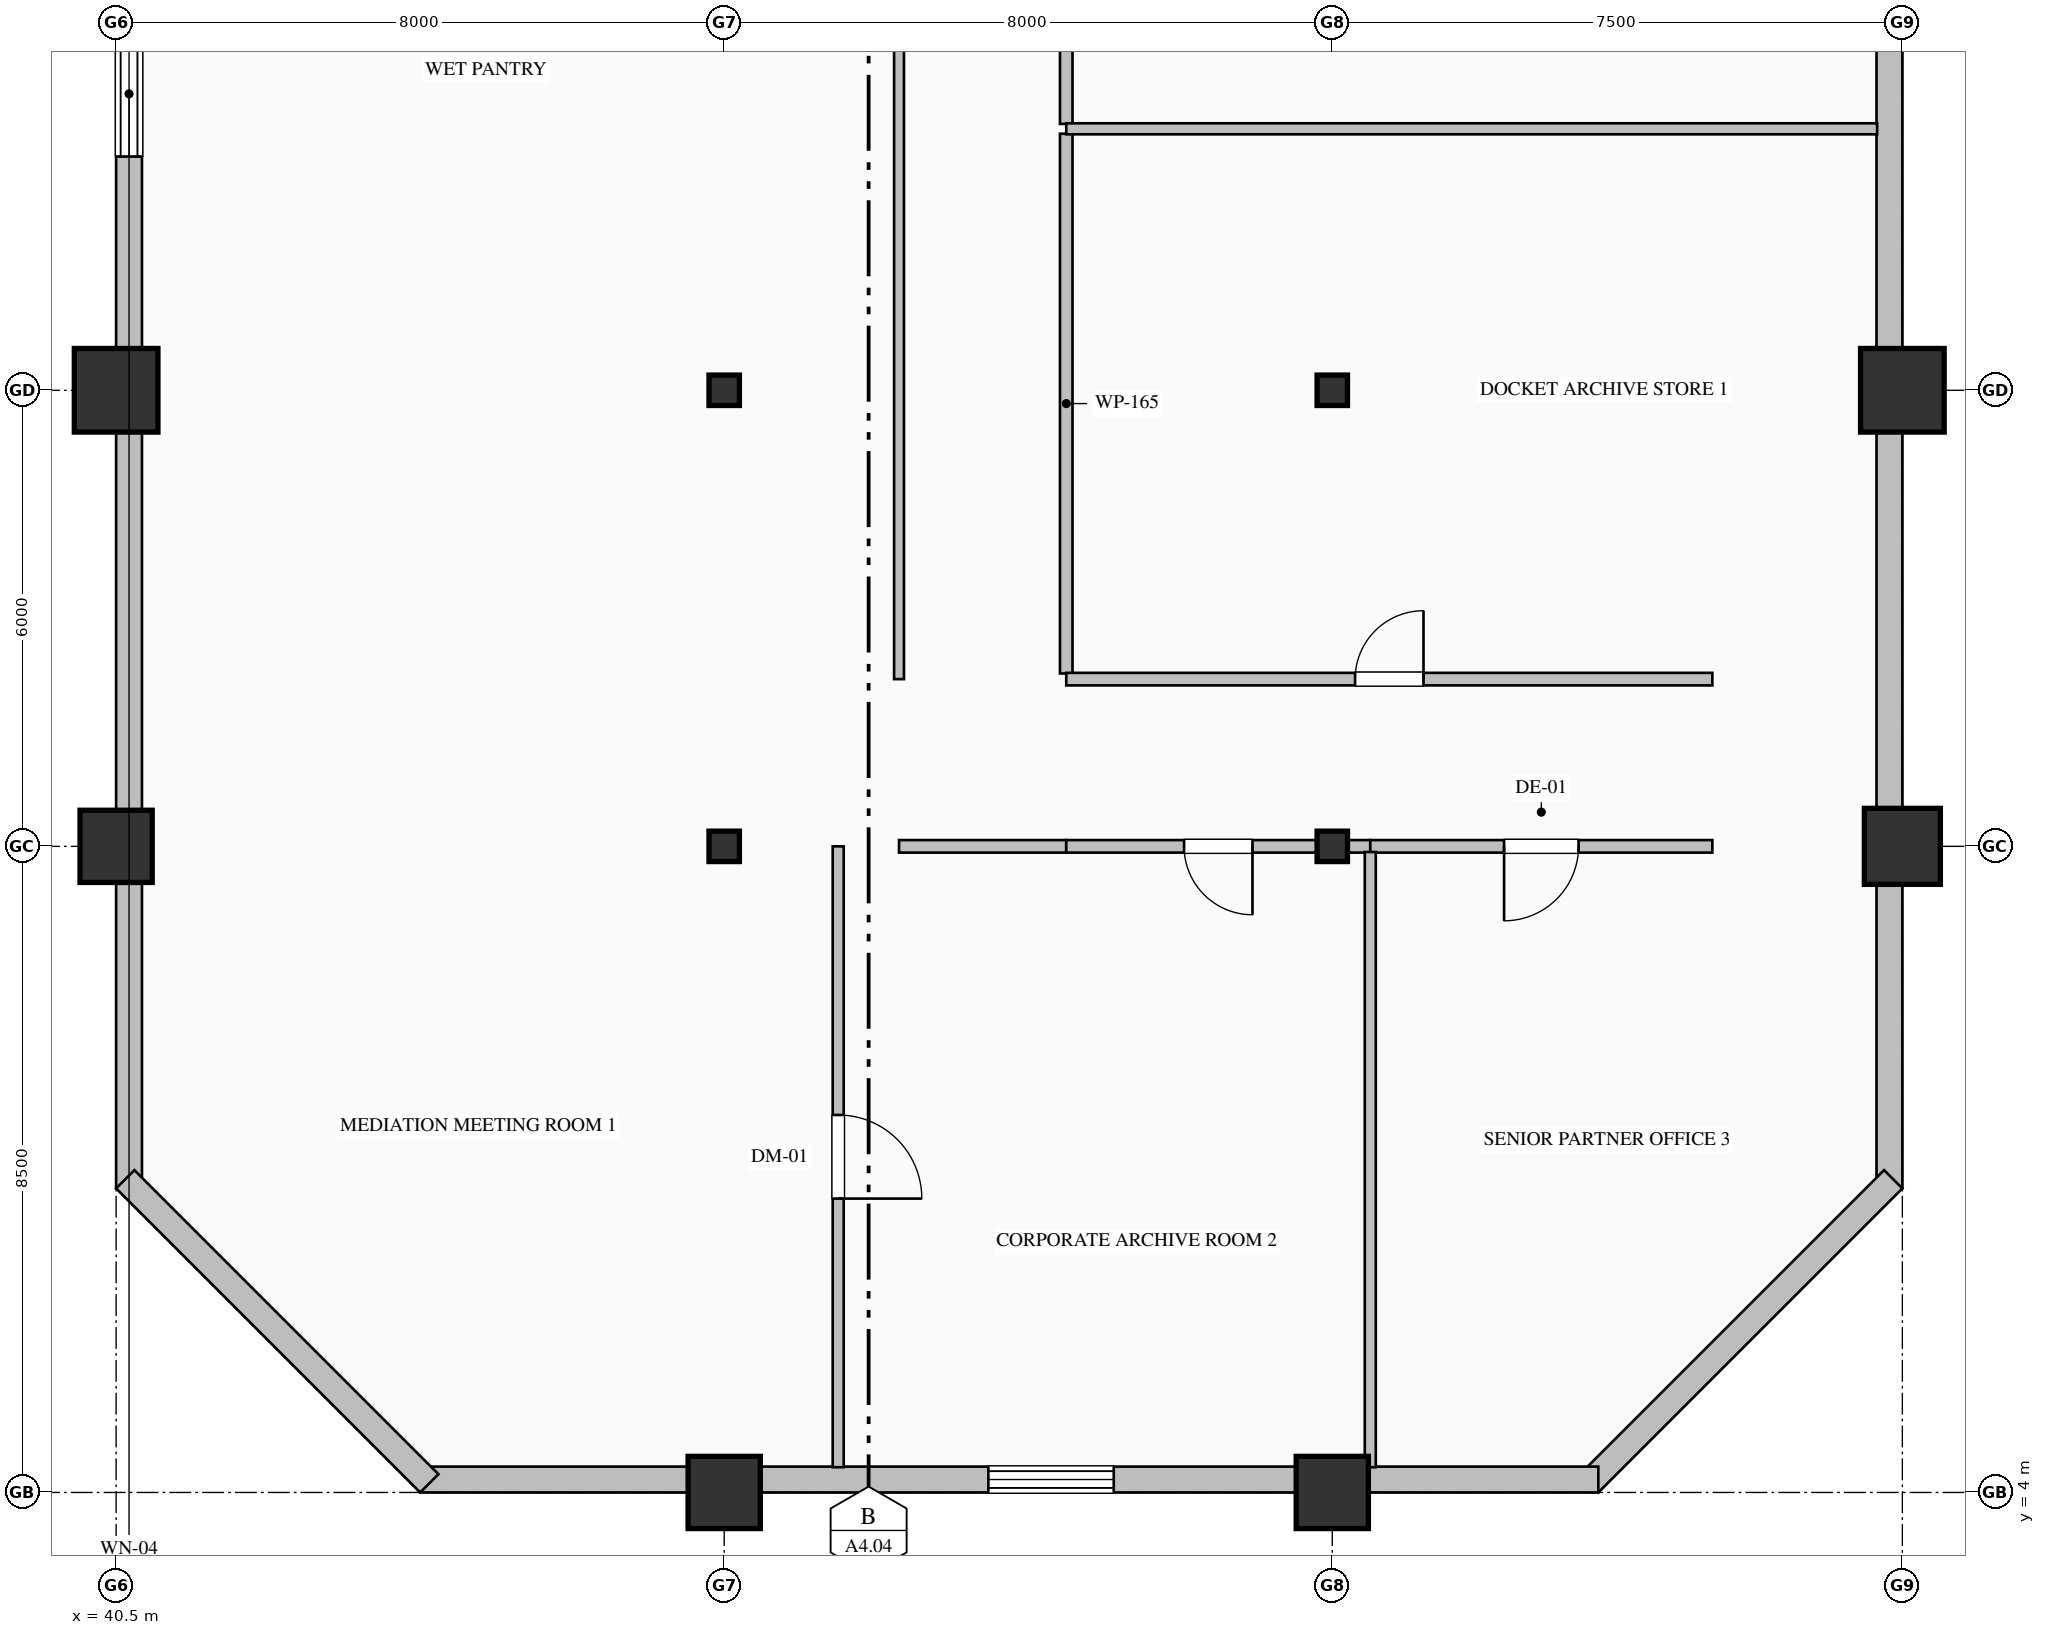
"""IFC4 building model, lengths in metres.
Left out: names, types, materials, properties, quantities, classifications, styles, units other than length and angle.
Written with IfcOpenShell. Run it as: python <this file> out.ifc"""

import sys

from ifc_helpers import new_model, si_unit, direction, frame, frame_2d, origin, origin_2d, place, context, subcontext, project, spatial, rectangle, hollow_rectangle, hollow_circle, i_section, extrude, element, fill, save


model = new_model("IFC4")
c1 = context("Model", 3, precision=1e-05, world=origin(), true_north=direction((0.0, 1.0)))
c2 = subcontext(c1, "Body", "Model", "MODEL_VIEW")
j1 = project(units=[si_unit("LENGTHUNIT", "METRE"), si_unit("PLANEANGLEUNIT", "RADIAN")], contexts=[c1])
p1 = place(None, origin())
s1 = spatial("IfcSite", under=j1, at=p1, CompositionType="ELEMENT")
p2 = place(p1, origin())
s2 = spatial("IfcBuilding", under=s1, at=p2, CompositionType="ELEMENT")
p3 = place(p2, frame((0.0, 0.0, 191.0)))
s3 = spatial("IfcBuildingStorey", under=s2, at=p3, CompositionType="ELEMENT", Elevation=191.0)
p4 = place(p3, frame((40.5, 12.5, 0.0), z_axis=(0.0, 0.0, 1.0), x_axis=(1.0, 0.0, 0.0)))
e1 = element("IfcColumn", 1, at=p4, inside=s3, PredefinedType="COLUMN", context=c2, shape_type="SweptSolid", body=[
    extrude(hollow_rectangle(XDim=0.95, YDim=0.95, WallThickness=0.036, at=origin_2d()), origin(), (0.0, 0.0, 1.0), 4.0),
])
p5 = place(p3, frame((40.5, 18.5, 0.0), z_axis=(0.0, 0.0, 1.0), x_axis=(1.0, 0.0, 0.0)))
e2 = element("IfcColumn", 2, at=p5, inside=s3, PredefinedType="COLUMN", context=c2, shape_type="SweptSolid", body=[
    extrude(hollow_rectangle(XDim=1.1, YDim=1.1, WallThickness=0.04, at=origin_2d()), origin(), (0.0, 0.0, 1.0), 4.0),
])
p6 = place(p3, frame((48.5, 4.0, 0.0), z_axis=(0.0, 0.0, 1.0), x_axis=(1.0, 0.0, 0.0)))
e3 = element("IfcColumn", 3, at=p6, inside=s3, PredefinedType="COLUMN", context=c2, shape_type="SweptSolid", body=[
    extrude(hollow_rectangle(XDim=0.95, YDim=0.95, WallThickness=0.036, at=origin_2d()), origin(), (0.0, 0.0, 1.0), 4.0),
])
for number, where, z_axis, x_axis in (
    (4, (48.5, 12.5, 0.0), (0.0, 0.0, 1.0), (1.0, 0.0, 0.0)),
    (5, (48.5, 18.5, 0.0), (0.0, 0.0, 1.0), (1.0, 0.0, 0.0)),
):
    element("IfcColumn", number, at=place(p3, frame(where, z_axis=z_axis, x_axis=x_axis)), inside=s3, PredefinedType="COLUMN", context=c2, shape_type="SweptSolid", body=[
        extrude(i_section(OverallWidth=0.4, OverallDepth=0.4, WebThickness=0.013, FlangeThickness=0.021, FilletRadius=0.022, at=origin_2d()), origin(), (0.0, 0.0, 1.0), 4.0),
    ])
p7 = place(p3, frame((56.5, 4.0, 0.0), z_axis=(0.0, 0.0, 1.0), x_axis=(1.0, 0.0, 0.0)))
e6 = element("IfcColumn", 6, at=p7, inside=s3, PredefinedType="COLUMN", context=c2, shape_type="SweptSolid", body=[
    extrude(hollow_rectangle(XDim=0.95, YDim=0.95, WallThickness=0.036, at=origin_2d()), origin(), (0.0, 0.0, 1.0), 4.0),
])
for number, where, z_axis, x_axis in (
    (7, (56.5, 12.5, 0.0), (0.0, 0.0, 1.0), (1.0, 0.0, 0.0)),
    (8, (56.5, 18.5, 0.0), (0.0, 0.0, 1.0), (1.0, 0.0, 0.0)),
):
    element("IfcColumn", number, at=place(p3, frame(where, z_axis=z_axis, x_axis=x_axis)), inside=s3, PredefinedType="COLUMN", context=c2, shape_type="SweptSolid", body=[
        extrude(i_section(OverallWidth=0.4, OverallDepth=0.4, WebThickness=0.013, FlangeThickness=0.021, FilletRadius=0.022, at=origin_2d()), origin(), (0.0, 0.0, 1.0), 4.0),
    ])
p8 = place(p3, frame((64.0, 12.5, 0.0), z_axis=(0.0, 0.0, 1.0), x_axis=(1.0, 0.0, 0.0)))
e9 = element("IfcColumn", 9, at=p8, inside=s3, PredefinedType="COLUMN", context=c2, shape_type="SweptSolid", body=[
    extrude(hollow_circle(Radius=0.5, WallThickness=0.036, at=origin_2d()), origin(), (0.0, 0.0, 1.0), 4.0),
])
p9 = place(p3, frame((64.0, 18.5, 0.0), z_axis=(0.0, 0.0, 1.0), x_axis=(1.0, 0.0, 0.0)))
e10 = element("IfcColumn", 10, at=p9, inside=s3, PredefinedType="COLUMN", context=c2, shape_type="SweptSolid", body=[
    extrude(hollow_rectangle(XDim=1.1, YDim=1.1, WallThickness=0.04, at=origin_2d()), origin(), (0.0, 0.0, 1.0), 4.0),
])
p10 = place(p3, frame((40.67, 8.0, 0.0), z_axis=(0.0, 0.0, 1.0), x_axis=(0.0, 1.0, 0.0)))
e11 = element("IfcWall", 11, at=p10, inside=s3, PredefinedType="SOLIDWALL", context=c2, shape_type="SweptSolid", body=[
    extrude(rectangle(XDim=20.34, YDim=0.34, at=frame_2d((10.17, 0.0))), origin(), (0.0, 0.0, 1.0), 3.05),
])
p11 = place(p10, frame((13.575, 0.0, 0.85)))
e12 = element("IfcOpeningElement", 12, at=p11, cuts=e11, PredefinedType="OPENING", context=c2, shape_type="SweptSolid", body=[
    extrude(rectangle(XDim=1.65, YDim=1.95, at=frame_2d((0.825, 0.975))), frame((0.0, 0.18, 0.0), z_axis=(0.0, -1.0, 0.0), x_axis=(1.0, 0.0, 0.0)), (0.0, 0.0, 1.0), 0.36),
])
p12 = place(p3, frame((63.83, 36.05, 0.0), z_axis=(0.0, 0.0, 1.0), x_axis=(0.0, -1.0, 0.0)))
e13 = element("IfcWall", 13, at=p12, inside=s3, PredefinedType="SOLIDWALL", context=c2, shape_type="SweptSolid", body=[
    extrude(rectangle(XDim=28.05, YDim=0.34, at=frame_2d((14.025, 0.0))), origin(), (0.0, 0.0, 1.0), 3.15),
])
p13 = place(p12, frame((2.775, 0.0, 0.85)))
e14 = element("IfcOpeningElement", 14, at=p13, cuts=e13, PredefinedType="OPENING", context=c2, shape_type="SweptSolid", body=[
    extrude(rectangle(XDim=1.65, YDim=1.95, at=frame_2d((0.825, 0.975))), frame((0.0, 0.18, 0.0), z_axis=(0.0, -1.0, 0.0), x_axis=(1.0, 0.0, 0.0)), (0.0, 0.0, 1.0), 0.36),
])
p14 = place(p12, frame((10.05, 0.0, 0.85)))
e15 = element("IfcOpeningElement", 15, at=p14, cuts=e13, PredefinedType="OPENING", context=c2, shape_type="SweptSolid", body=[
    extrude(rectangle(XDim=1.5, YDim=1.95, at=frame_2d((0.75, 0.975))), frame((0.0, 0.18, 0.0), z_axis=(0.0, -1.0, 0.0), x_axis=(1.0, 0.0, 0.0)), (0.0, 0.0, 1.0), 0.36),
])
p15 = place(p3, frame((63.88, 8.12, 0.0), z_axis=(0.0, 0.0, 1.0), x_axis=(-0.707106781187, -0.707106781187, 0.0)))
e16 = element("IfcWall", 16, at=p15, inside=s3, PredefinedType="SOLIDWALL", context=c2, shape_type="SweptSolid", body=[
    extrude(rectangle(XDim=5.657, YDim=0.34, at=frame_2d((2.828, 0.0))), origin(), (0.0, 0.0, 1.0), 3.65),
])
p16 = place(p3, frame((60.0, 4.17, 0.0), z_axis=(0.0, 0.0, 1.0), x_axis=(-1.0, 0.0, 0.0)))
e17 = element("IfcWall", 17, at=p16, inside=s3, PredefinedType="SOLIDWALL", context=c2, shape_type="SweptSolid", body=[
    extrude(rectangle(XDim=15.5, YDim=0.34, at=frame_2d((7.75, 0.0))), origin(), (0.0, 0.0, 1.0), 3.15),
])
p17 = place(p16, frame((6.375, 0.0, 0.85)))
e18 = element("IfcOpeningElement", 18, at=p17, cuts=e17, PredefinedType="OPENING", context=c2, shape_type="SweptSolid", body=[
    extrude(rectangle(XDim=1.65, YDim=1.95, at=frame_2d((0.825, 0.975))), frame((0.0, 0.18, 0.0), z_axis=(0.0, -1.0, 0.0), x_axis=(1.0, 0.0, 0.0)), (0.0, 0.0, 1.0), 0.36),
])
p18 = place(p3, frame((44.62, 4.12, 0.0), z_axis=(0.0, 0.0, 1.0), x_axis=(-0.707106781187, 0.707106781187, 0.0)))
e19 = element("IfcWall", 19, at=p18, inside=s3, PredefinedType="SOLIDWALL", context=c2, shape_type="SweptSolid", body=[
    extrude(rectangle(XDim=5.657, YDim=0.34, at=frame_2d((2.828, 0.0))), origin(), (0.0, 0.0, 1.0), 3.65),
])
p19 = place(p3, frame((53.0, 21.875, 0.0), z_axis=(0.0, 0.0, 1.0), x_axis=(0.0, -1.0, 0.0)))
e20 = element("IfcWall", 20, at=p19, inside=s3, PredefinedType="PARTITIONING", context=c2, shape_type="SweptSolid", body=[
    extrude(rectangle(XDim=7.101, YDim=0.165, at=frame_2d((3.551, 0.0))), origin(), (0.0, 0.0, 1.0), 3.65),
])
p20 = place(p3, frame((53.0, 28.906, 0.0), z_axis=(0.0, 0.0, 1.0), x_axis=(0.0, -1.0, 0.0)))
e21 = element("IfcWall", 21, at=p20, inside=s3, PredefinedType="PARTITIONING", context=c2, shape_type="SweptSolid", body=[
    extrude(rectangle(XDim=6.901, YDim=0.165, at=frame_2d((3.451, 0.0))), origin(), (0.0, 0.0, 1.0), 3.65),
])
p21 = place(p20, frame((3.0, 0.0, 0.0)))
e22 = element("IfcOpeningElement", 22, at=p21, cuts=e21, PredefinedType="OPENING", context=c2, shape_type="SweptSolid", body=[
    extrude(rectangle(XDim=0.9, YDim=2.15, at=frame_2d((0.45, 1.075))), frame((0.0, 0.093, 0.0), z_axis=(0.0, -1.0, 0.0), x_axis=(1.0, 0.0, 0.0)), (0.0, 0.0, 1.0), 0.185),
])
p22 = place(p3, frame((50.8, 14.7, 0.0), z_axis=(0.0, 0.0, 1.0), x_axis=(0.0, 1.0, 0.0)))
e23 = element("IfcWall", 23, at=p22, inside=s3, PredefinedType="PARTITIONING", context=c2, shape_type="SweptSolid", body=[
    extrude(rectangle(XDim=18.843, YDim=0.13, at=frame_2d((9.421, 0.0))), origin(), (0.0, 0.0, 1.0), 3.65),
])
p23 = place(p22, frame((8.921, 0.0, 0.0)))
e24 = element("IfcOpeningElement", 24, at=p23, cuts=e23, PredefinedType="OPENING", context=c2, shape_type="SweptSolid", body=[
    extrude(rectangle(XDim=1.0, YDim=2.15, at=frame_2d((0.5, 1.075))), frame((0.0, 0.075, 0.0), z_axis=(0.0, -1.0, 0.0), x_axis=(1.0, 0.0, 0.0)), (0.0, 0.0, 1.0), 0.15),
])
p24 = place(p3, frame((53.0, 12.5, 0.0), z_axis=(0.0, 0.0, 1.0), x_axis=(-1.0, 0.0, 0.0)))
e25 = element("IfcWall", 25, at=p24, inside=s3, PredefinedType="PARTITIONING", context=c2, shape_type="SweptSolid", body=[
    extrude(rectangle(XDim=2.2, YDim=0.165, at=frame_2d((1.1, 0.0))), origin(), (0.0, 0.0, 1.0), 3.042),
])
p25 = place(p3, frame((53.0, 14.7, 0.0), z_axis=(0.0, 0.0, 1.0), x_axis=(1.0, 0.0, 0.0)))
e26 = element("IfcWall", 26, at=p25, inside=s3, PredefinedType="PARTITIONING", context=c2, shape_type="SweptSolid", body=[
    extrude(rectangle(XDim=8.5, YDim=0.165, at=frame_2d((4.25, 0.0))), origin(), (0.0, 0.0, 1.0), 3.65),
])
p26 = place(p25, frame((3.8, 0.0, 0.0)))
e27 = element("IfcOpeningElement", 27, at=p26, cuts=e26, PredefinedType="OPENING", context=c2, shape_type="SweptSolid", body=[
    extrude(rectangle(XDim=0.9, YDim=2.15, at=frame_2d((0.45, 1.075))), frame((0.0, 0.093, 0.0), z_axis=(0.0, -1.0, 0.0), x_axis=(1.0, 0.0, 0.0)), (0.0, 0.0, 1.0), 0.185),
])
p27 = place(p3, frame((57.0, 12.5, 0.0), z_axis=(0.0, 0.0, 1.0), x_axis=(-1.0, 0.0, 0.0)))
e28 = element("IfcWall", 28, at=p27, inside=s3, PredefinedType="PARTITIONING", context=c2, shape_type="SweptSolid", body=[
    extrude(rectangle(XDim=4.0, YDim=0.165, at=frame_2d((2.0, 0.0))), origin(), (0.0, 0.0, 1.0), 3.042),
])
p28 = place(p27, frame((1.55, 0.0, 0.0)))
e29 = element("IfcOpeningElement", 29, at=p28, cuts=e28, PredefinedType="OPENING", context=c2, shape_type="SweptSolid", body=[
    extrude(rectangle(XDim=0.9, YDim=2.15, at=frame_2d((0.45, 1.075))), frame((0.0, 0.093, 0.0), z_axis=(0.0, -1.0, 0.0), x_axis=(1.0, 0.0, 0.0)), (0.0, 0.0, 1.0), 0.185),
])
p29 = place(p3, frame((61.5, 12.5, 0.0), z_axis=(0.0, 0.0, 1.0), x_axis=(-1.0, 0.0, 0.0)))
e30 = element("IfcWall", 30, at=p29, inside=s3, PredefinedType="PARTITIONING", context=c2, shape_type="SweptSolid", body=[
    extrude(rectangle(XDim=4.5, YDim=0.165, at=frame_2d((2.25, 0.0))), origin(), (0.0, 0.0, 1.0), 3.042),
])
p30 = place(p29, frame((1.76, 0.0, 0.0)))
e31 = element("IfcOpeningElement", 31, at=p30, cuts=e30, PredefinedType="OPENING", context=c2, shape_type="SweptSolid", body=[
    extrude(rectangle(XDim=0.98, YDim=2.25, at=frame_2d((0.49, 1.125))), frame((0.0, 0.093, 0.0), z_axis=(0.0, -1.0, 0.0), x_axis=(1.0, 0.0, 0.0)), (0.0, 0.0, 1.0), 0.185),
])
p31 = place(p3, frame((53.0, 21.94, 0.0), z_axis=(0.0, 0.0, 1.0), x_axis=(1.0, 0.0, 0.0)))
e32 = element("IfcWall", 32, at=p31, inside=s3, PredefinedType="PARTITIONING", context=c2, shape_type="SweptSolid", body=[
    extrude(rectangle(XDim=10.668, YDim=0.145, at=frame_2d((5.334, 0.0))), origin(), (0.0, 0.0, 1.0), 3.65),
])
p32 = place(p3, frame((50.0, 12.5, 0.0), z_axis=(0.0, 0.0, 1.0), x_axis=(0.0, -1.0, 0.0)))
e33 = element("IfcWall", 33, at=p32, inside=s3, PredefinedType="PARTITIONING", context=c2, shape_type="SweptSolid", body=[
    extrude(rectangle(XDim=8.168, YDim=0.145, at=frame_2d((4.084, 0.0))), origin(), (0.0, 0.0, 1.0), 3.65),
])
p33 = place(p32, frame((3.534, 0.0, 0.0)))
e34 = element("IfcOpeningElement", 34, at=p33, cuts=e33, PredefinedType="OPENING", context=c2, shape_type="SweptSolid", body=[
    extrude(rectangle(XDim=1.1, YDim=2.2, at=frame_2d((0.55, 1.1))), frame((0.0, 0.083, 0.0), z_axis=(0.0, -1.0, 0.0), x_axis=(1.0, 0.0, 0.0)), (0.0, 0.0, 1.0), 0.165),
])
p34 = place(p3, frame((57.0, 12.426, 0.0), z_axis=(0.0, 0.0, 1.0), x_axis=(0.0, -1.0, 0.0)))
e35 = element("IfcWall", 35, at=p34, inside=s3, PredefinedType="PARTITIONING", context=c2, shape_type="SweptSolid", body=[
    extrude(rectangle(XDim=8.094, YDim=0.145, at=frame_2d((4.047, 0.0))), origin(), (0.0, 0.0, 1.0), 3.65),
])
p35 = place(p11, origin())
e36 = element("IfcWindow", 36, at=p35, inside=s3, PartitioningType="DOUBLE_PANEL_VERTICAL", PredefinedType="WINDOW", context=c2, shape_type="SweptSolid", body=[
    extrude(rectangle(XDim=1.65, YDim=1.95, at=frame_2d((0.825, 0.975))), frame((0.0, 0.15, 0.0), z_axis=(0.0, -1.0, 0.0), x_axis=(1.0, 0.0, 0.0)), (0.0, 0.0, 1.0), 0.06),
])
fill(e12, e36)
p36 = place(p17, origin())
e37 = element("IfcWindow", 37, at=p36, inside=s3, PartitioningType="DOUBLE_PANEL_VERTICAL", PredefinedType="WINDOW", context=c2, shape_type="SweptSolid", body=[
    extrude(rectangle(XDim=1.65, YDim=1.95, at=frame_2d((0.825, 0.975))), frame((0.0, 0.15, 0.0), z_axis=(0.0, -1.0, 0.0), x_axis=(1.0, 0.0, 0.0)), (0.0, 0.0, 1.0), 0.06),
])
fill(e18, e37)
p37 = place(p26, origin())
e38 = element("IfcDoor", 38, at=p37, inside=s3, OperationType="SINGLE_SWING_RIGHT", PredefinedType="DOOR", context=c2, shape_type="SweptSolid", body=[
    extrude(rectangle(XDim=0.9, YDim=2.15, at=frame_2d((0.45, 1.075))), frame((0.0, 0.025, 0.0), z_axis=(0.0, -1.0, 0.0), x_axis=(1.0, 0.0, 0.0)), (0.0, 0.0, 1.0), 0.05),
])
fill(e27, e38)
p38 = place(p33, origin())
e39 = element("IfcDoor", 39, at=p38, inside=s3, OperationType="SINGLE_SWING_RIGHT", PredefinedType="DOOR", context=c2, shape_type="SweptSolid", body=[
    extrude(rectangle(XDim=1.1, YDim=2.2, at=frame_2d((0.55, 1.1))), frame((0.0, 0.025, 0.0), z_axis=(0.0, -1.0, 0.0), x_axis=(1.0, 0.0, 0.0)), (0.0, 0.0, 1.0), 0.05),
])
fill(e34, e39)
p39 = place(p28, origin())
e40 = element("IfcDoor", 40, at=p39, inside=s3, OperationType="SINGLE_SWING_LEFT", PredefinedType="DOOR", context=c2, shape_type="SweptSolid", body=[
    extrude(rectangle(XDim=0.9, YDim=2.15, at=frame_2d((0.45, 1.075))), frame((0.0, 0.025, 0.0), z_axis=(0.0, -1.0, 0.0), x_axis=(1.0, 0.0, 0.0)), (0.0, 0.0, 1.0), 0.05),
])
fill(e29, e40)
p40 = place(p30, origin())
e41 = element("IfcDoor", 41, at=p40, inside=s3, OperationType="SINGLE_SWING_RIGHT", PredefinedType="DOOR", context=c2, shape_type="SweptSolid", body=[
    extrude(rectangle(XDim=0.98, YDim=2.25, at=frame_2d((0.49, 1.125))), frame((0.0, 0.025, 0.0), z_axis=(0.0, -1.0, 0.0), x_axis=(1.0, 0.0, 0.0)), (0.0, 0.0, 1.0), 0.05),
])
fill(e31, e41)
save(model, sys.argv[1])
